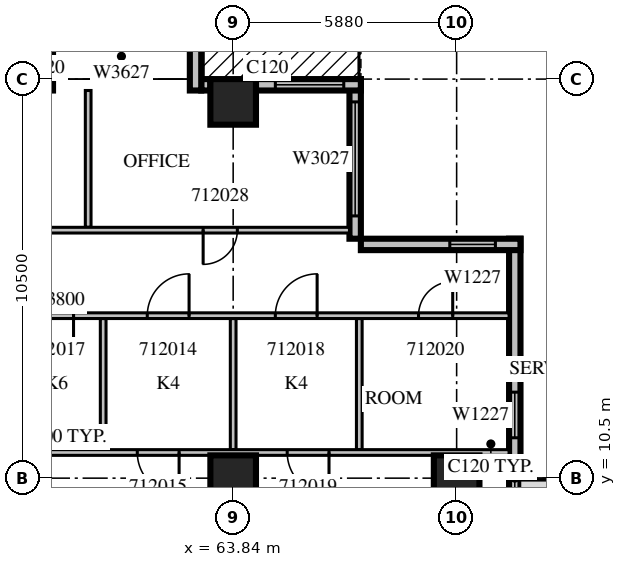
"""IFC4 building model, lengths in metres.
Left out: names, types, materials, properties, quantities, classifications, styles, units other than length and angle.
Written with IfcOpenShell. Run it as: python <this file> out.ifc"""

import sys

from ifc_helpers import new_model, si_unit, direction, frame, frame_2d, origin, origin_2d, place, context, subcontext, project, spatial, rectangle, extrude, source, transform, mapped, element, fill, save


model = new_model("IFC4")
c1 = context("Model", 3, precision=1e-05, world=origin(), true_north=direction((0.0, 1.0)))
c2 = subcontext(c1, "Body", "Model", "MODEL_VIEW")
j1 = project(units=[si_unit("LENGTHUNIT", "METRE"), si_unit("PLANEANGLEUNIT", "RADIAN")], contexts=[c1])
p1 = place(None, origin())
s1 = spatial("IfcSite", under=j1, at=p1, CompositionType="ELEMENT")
p2 = place(p1, origin())
s2 = spatial("IfcBuilding", under=s1, at=p2, CompositionType="ELEMENT")
p3 = place(p2, frame((0.0, 0.0, 61.5)))
s3 = spatial("IfcBuildingStorey", under=s2, at=p3, CompositionType="ELEMENT", Elevation=61.5)
m1 = source(origin(), c2, "Body", "SweptSolid", [
    extrude(rectangle(XDim=1.2, YDim=1.2, at=origin_2d()), origin(), (0.0, 0.0, 1.0), 4.2),
])
for number, where, z_axis, x_axis in (
    (1, (63.84, 10.5, 0.0), (0.0, 0.0, 1.0), (1.0, 0.0, 0.0)),
    (2, (69.72, 10.5, 0.0), (0.0, 0.0, 1.0), (1.0, 0.0, 0.0)),
    (3, (63.84, 20.4, 0.0), (0.0, 0.0, 1.0), (1.0, 0.0, 0.0)),
):
    element("IfcColumn", number, at=place(p3, frame(where, z_axis=z_axis, x_axis=x_axis)), inside=s3, PredefinedType="COLUMN", context=c2, shape_type="MappedRepresentation", body=[
        mapped(m1, transform((0.0, 0.0, 0.0), scale=1.0)),
    ])
m2 = source(origin(), c2, "Body", "SweptSolid", [
    extrude(rectangle(XDim=3.15, YDim=0.3, at=frame_2d((1.575, 0.0))), origin(), (0.0, 0.0, 1.0), 3.8),
])
p4 = place(p3, frame((71.25, 7.35, 0.0), z_axis=(0.0, 0.0, 1.0), x_axis=(0.0, 1.0, 0.0)))
e4 = element("IfcWall", 4, at=p4, inside=s3, PredefinedType="STANDARD", context=c2, shape_type="MappedRepresentation", body=[
    mapped(m2, transform((0.0, 0.0, 0.0), scale=1.0)),
])
m3 = source(origin(), c2, "Body", "SweptSolid", [
    extrude(rectangle(XDim=1.8, YDim=2.4, at=frame_2d((0.9, 1.2))), frame((0.0, 0.16, 0.0), z_axis=(0.0, -1.0, 0.0), x_axis=(1.0, 0.0, 0.0)), (0.0, 0.0, 1.0), 0.32),
])
p5 = place(p4, frame((0.675, 0.0, 0.0)))
e5 = element("IfcOpeningElement", 5, at=p5, cuts=e4, PredefinedType="OPENING", context=c2, shape_type="MappedRepresentation", body=[
    mapped(m3, transform((0.0, 0.0, 0.0), scale=1.0)),
])
m4 = source(origin(), c2, "Body", "SweptSolid", [
    extrude(rectangle(XDim=6.3, YDim=0.3, at=frame_2d((3.15, 0.0))), origin(), (0.0, 0.0, 1.0), 3.8),
])
p6 = place(p3, frame((71.25, 10.5, 0.0), z_axis=(0.0, 0.0, 1.0), x_axis=(0.0, 1.0, 0.0)))
e6 = element("IfcWall", 6, at=p6, inside=s3, PredefinedType="STANDARD", context=c2, shape_type="MappedRepresentation", body=[
    mapped(m4, transform((0.0, 0.0, 0.0), scale=1.0)),
])
m5 = source(origin(), c2, "Body", "SweptSolid", [
    extrude(rectangle(XDim=1.2, YDim=2.7, at=frame_2d((0.6, 1.35))), frame((0.0, 0.16, 0.0), z_axis=(0.0, -1.0, 0.0), x_axis=(1.0, 0.0, 0.0)), (0.0, 0.0, 1.0), 0.32),
])
p7 = place(p6, frame((1.062, 0.0, 0.6)))
e7 = element("IfcOpeningElement", 7, at=p7, cuts=e6, PredefinedType="OPENING", context=c2, shape_type="MappedRepresentation", body=[
    mapped(m5, transform((0.0, 0.0, 0.0), scale=1.0)),
])
m6 = source(origin(), c2, "Body", "SweptSolid", [
    extrude(rectangle(XDim=4.2, YDim=0.3, at=frame_2d((2.1, 0.0))), origin(), (0.0, 0.0, 1.0), 3.8),
])
p8 = place(p3, frame((71.4, 16.65, 0.0), z_axis=(0.0, 0.0, 1.0), x_axis=(-1.0, 0.0, 0.0)))
e8 = element("IfcWall", 8, at=p8, inside=s3, PredefinedType="STANDARD", context=c2, shape_type="MappedRepresentation", body=[
    mapped(m6, transform((0.0, 0.0, 0.0), scale=1.0)),
])
p9 = place(p8, frame((0.66, 0.0, 0.6)))
e9 = element("IfcOpeningElement", 9, at=p9, cuts=e8, PredefinedType="OPENING", context=c2, shape_type="MappedRepresentation", body=[
    mapped(m5, transform((0.0, 0.0, 0.0), scale=1.0)),
])
p10 = place(p3, frame((67.05, 16.8, 0.0), z_axis=(0.0, 0.0, 1.0), x_axis=(0.0, 1.0, 0.0)))
e10 = element("IfcWall", 10, at=p10, inside=s3, PredefinedType="STANDARD", context=c2, shape_type="MappedRepresentation", body=[
    mapped(m6, transform((0.0, 0.0, 0.0), scale=1.0)),
])
m7 = source(origin(), c2, "Body", "SweptSolid", [
    extrude(rectangle(XDim=3.0, YDim=2.7, at=frame_2d((1.5, 1.35))), frame((0.0, 0.16, 0.0), z_axis=(0.0, -1.0, 0.0), x_axis=(1.0, 0.0, 0.0)), (0.0, 0.0, 1.0), 0.32),
])
p11 = place(p10, frame((0.6, 0.0, 0.6)))
e11 = element("IfcOpeningElement", 11, at=p11, cuts=e10, PredefinedType="OPENING", context=c2, shape_type="MappedRepresentation", body=[
    mapped(m7, transform((0.0, 0.0, 0.0), scale=1.0)),
])
m8 = source(origin(), c2, "Body", "SweptSolid", [
    extrude(rectangle(XDim=2.76, YDim=0.3, at=frame_2d((1.38, 0.0))), origin(), (0.0, 0.0, 1.0), 3.8),
])
p12 = place(p3, frame((67.2, 20.85, 0.0), z_axis=(0.0, 0.0, 1.0), x_axis=(-1.0, 0.0, 0.0)))
e12 = element("IfcWall", 12, at=p12, inside=s3, PredefinedType="STANDARD", context=c2, shape_type="MappedRepresentation", body=[
    mapped(m8, transform((0.0, 0.0, 0.0), scale=1.0)),
])
p13 = place(p12, frame((0.45, 0.0, 0.0)))
e13 = element("IfcOpeningElement", 13, at=p13, cuts=e12, PredefinedType="OPENING", context=c2, shape_type="MappedRepresentation", body=[
    mapped(m3, transform((0.0, 0.0, 0.0), scale=1.0)),
])
m9 = source(origin(), c2, "Body", "SweptSolid", [
    extrude(rectangle(XDim=0.24, YDim=0.3, at=frame_2d((0.12, 0.0))), origin(), (0.0, 0.0, 1.0), 3.8),
])
p14 = place(p3, frame((63.24, 20.85, 0.0), z_axis=(0.0, 0.0, 1.0), x_axis=(-1.0, 0.0, 0.0)))
e14 = element("IfcWall", 14, at=p14, inside=s3, PredefinedType="STANDARD", context=c2, shape_type="MappedRepresentation", body=[
    mapped(m9, transform((0.0, 0.0, 0.0), scale=1.0)),
])
m10 = source(origin(), c2, "Body", "SweptSolid", [
    extrude(rectangle(XDim=1.2, YDim=0.3, at=frame_2d((0.6, 0.0))), origin(), (0.0, 0.0, 1.0), 3.8),
])
p15 = place(p3, frame((62.85, 20.7, 0.0), z_axis=(0.0, 0.0, 1.0), x_axis=(0.0, 1.0, 0.0)))
e15 = element("IfcWall", 15, at=p15, inside=s3, PredefinedType="STANDARD", context=c2, shape_type="MappedRepresentation", body=[
    mapped(m10, transform((0.0, 0.0, 0.0), scale=1.0)),
])
m11 = source(origin(), c2, "Body", "SweptSolid", [
    extrude(rectangle(XDim=3.45, YDim=0.15, at=frame_2d((1.725, 0.0))), origin(), (0.0, 0.0, 1.0), 3.8),
])
for number, where, z_axis, x_axis in (
    (16, (60.42, 11.25, 0.0), (0.0, 0.0, 1.0), (0.0, 1.0, 0.0)),
    (17, (67.158, 11.25, 0.0), (0.0, 0.0, 1.0), (0.0, 1.0, 0.0)),
    (18, (63.84, 11.25, 0.0), (0.0, 0.0, 1.0), (0.0, 1.0, 0.0)),
):
    element("IfcWall", number, at=place(p3, frame(where, z_axis=z_axis, x_axis=x_axis)), inside=s3, PredefinedType="PARTITIONING", context=c2, shape_type="MappedRepresentation", body=[
        mapped(m11, transform((0.0, 0.0, 0.0), scale=1.0)),
    ])
m12 = source(origin(), c2, "Body", "SweptSolid", [
    extrude(rectangle(XDim=24.9, YDim=0.15, at=frame_2d((12.45, 0.0))), origin(), (0.0, 0.0, 1.0), 3.8),
])
p16 = place(p3, frame((71.1, 11.175, 0.0), z_axis=(0.0, 0.0, 1.0), x_axis=(-1.0, 0.0, 0.0)))
e19 = element("IfcWall", 19, at=p16, inside=s3, PredefinedType="PARTITIONING", context=c2, shape_type="MappedRepresentation", body=[
    mapped(m12, transform((0.0, 0.0, 0.0), scale=1.0)),
])
m13 = source(origin(), c2, "Body", "SweptSolid", [
    extrude(rectangle(XDim=1.1, YDim=2.1, at=frame_2d((0.55, 1.05))), frame((0.0, 0.085, 0.0), z_axis=(0.0, -1.0, 0.0), x_axis=(1.0, 0.0, 0.0)), (0.0, 0.0, 1.0), 0.17),
])
p17 = place(p16, frame((22.753, 0.0, 0.0)))
e20 = element("IfcOpeningElement", 20, at=p17, cuts=e19, PredefinedType="OPENING", context=c2, shape_type="MappedRepresentation", body=[
    mapped(m13, transform((0.0, 0.0, 0.0), scale=1.0)),
])
p18 = place(p16, frame((8.683, 0.0, 0.0)))
e21 = element("IfcOpeningElement", 21, at=p18, cuts=e19, PredefinedType="OPENING", context=c2, shape_type="MappedRepresentation", body=[
    mapped(m13, transform((0.0, 0.0, 0.0), scale=1.0)),
])
p19 = place(p16, frame((4.738, 0.0, 0.0)))
e22 = element("IfcOpeningElement", 22, at=p19, cuts=e19, PredefinedType="OPENING", context=c2, shape_type="MappedRepresentation", body=[
    mapped(m13, transform((0.0, 0.0, 0.0), scale=1.0)),
])
m14 = source(origin(), c2, "Body", "SweptSolid", [
    extrude(rectangle(XDim=3.6, YDim=0.15, at=frame_2d((1.8, 0.0))), origin(), (0.0, 0.0, 1.0), 3.8),
])
p20 = place(p3, frame((60.025, 20.7, 0.0), z_axis=(0.0, 0.0, 1.0), x_axis=(0.0, -1.0, 0.0)))
e23 = element("IfcWall", 23, at=p20, inside=s3, PredefinedType="PARTITIONING", context=c2, shape_type="MappedRepresentation", body=[
    mapped(m14, transform((0.0, 0.0, 0.0), scale=1.0)),
])
p21 = place(p3, frame((71.1, 14.775, 0.0), z_axis=(0.0, 0.0, 1.0), x_axis=(-1.0, 0.0, 0.0)))
e24 = element("IfcWall", 24, at=p21, inside=s3, PredefinedType="PARTITIONING", context=c2, shape_type="MappedRepresentation", body=[
    mapped(m12, transform((0.0, 0.0, 0.0), scale=1.0)),
])
p22 = place(p21, frame((23.066, 0.0, 0.0)))
e25 = element("IfcOpeningElement", 25, at=p22, cuts=e24, PredefinedType="OPENING", context=c2, shape_type="MappedRepresentation", body=[
    mapped(m13, transform((0.0, 0.0, 0.0), scale=1.0)),
])
m15 = source(origin(), c2, "Body", "SweptSolid", [
    extrude(rectangle(XDim=0.9, YDim=2.1, at=frame_2d((0.45, 1.05))), frame((0.0, 0.085, 0.0), z_axis=(0.0, -1.0, 0.0), x_axis=(1.0, 0.0, 0.0)), (0.0, 0.0, 1.0), 0.17),
])
p23 = place(p21, frame((20.226, 0.0, 0.0)))
e26 = element("IfcOpeningElement", 26, at=p23, cuts=e24, PredefinedType="OPENING", context=c2, shape_type="MappedRepresentation", body=[
    mapped(m15, transform((0.0, 0.0, 0.0), scale=1.0)),
])
p24 = place(p21, frame((8.42, 0.0, 0.0)))
e27 = element("IfcOpeningElement", 27, at=p24, cuts=e24, PredefinedType="OPENING", context=c2, shape_type="MappedRepresentation", body=[
    mapped(m13, transform((0.0, 0.0, 0.0), scale=1.0)),
])
p25 = place(p21, frame((15.63, 0.0, 0.0)))
e28 = element("IfcOpeningElement", 28, at=p25, cuts=e24, PredefinedType="OPENING", context=c2, shape_type="MappedRepresentation", body=[
    mapped(m15, transform((0.0, 0.0, 0.0), scale=1.0)),
])
p26 = place(p21, frame((11.46, 0.0, 0.0)))
e29 = element("IfcOpeningElement", 29, at=p26, cuts=e24, PredefinedType="OPENING", context=c2, shape_type="MappedRepresentation", body=[
    mapped(m15, transform((0.0, 0.0, 0.0), scale=1.0)),
])
p27 = place(p21, frame((5.051, 0.0, 0.0)))
e30 = element("IfcOpeningElement", 30, at=p27, cuts=e24, PredefinedType="OPENING", context=c2, shape_type="MappedRepresentation", body=[
    mapped(m13, transform((0.0, 0.0, 0.0), scale=1.0)),
])
p28 = place(p21, frame((1.483, 0.0, 0.0)))
e31 = element("IfcOpeningElement", 31, at=p28, cuts=e24, PredefinedType="OPENING", context=c2, shape_type="MappedRepresentation", body=[
    mapped(m15, transform((0.0, 0.0, 0.0), scale=1.0)),
])
m16 = source(origin(), c2, "Body", "SweptSolid", [
    extrude(rectangle(XDim=37.5, YDim=0.15, at=frame_2d((18.75, 0.0))), origin(), (0.0, 0.0, 1.0), 3.3),
])
p29 = place(p3, frame((29.4, 17.025, 0.0), z_axis=(0.0, 0.0, 1.0), x_axis=(1.0, 0.0, 0.0)))
e32 = element("IfcWall", 32, at=p29, inside=s3, PredefinedType="PARTITIONING", context=c2, shape_type="MappedRepresentation", body=[
    mapped(m16, transform((0.0, 0.0, 0.0), scale=1.0)),
])
m17 = source(origin(), c2, "Body", "SweptSolid", [
    extrude(rectangle(XDim=1.0, YDim=2.1, at=frame_2d((0.5, 1.05))), frame((0.0, 0.085, 0.0), z_axis=(0.0, -1.0, 0.0), x_axis=(1.0, 0.0, 0.0)), (0.0, 0.0, 1.0), 0.17),
])
p30 = place(p29, frame((1.357, 0.0, 0.0)))
e33 = element("IfcOpeningElement", 33, at=p30, cuts=e32, PredefinedType="OPENING", context=c2, shape_type="MappedRepresentation", body=[
    mapped(m17, transform((0.0, 0.0, 0.0), scale=1.0)),
])
p31 = place(p29, frame((4.669, 0.0, 0.0)))
e34 = element("IfcOpeningElement", 34, at=p31, cuts=e32, PredefinedType="OPENING", context=c2, shape_type="MappedRepresentation", body=[
    mapped(m17, transform((0.0, 0.0, 0.0), scale=1.0)),
])
p32 = place(p29, frame((7.012, 0.0, 0.0)))
e35 = element("IfcOpeningElement", 35, at=p32, cuts=e32, PredefinedType="OPENING", context=c2, shape_type="MappedRepresentation", body=[
    mapped(m17, transform((0.0, 0.0, 0.0), scale=1.0)),
])
p33 = place(p29, frame((10.05, 0.0, 0.0)))
e36 = element("IfcOpeningElement", 36, at=p33, cuts=e32, PredefinedType="OPENING", context=c2, shape_type="MappedRepresentation", body=[
    mapped(m15, transform((0.0, 0.0, 0.0), scale=1.0)),
])
p34 = place(p29, frame((14.25, 0.0, 0.0)))
e37 = element("IfcOpeningElement", 37, at=p34, cuts=e32, PredefinedType="OPENING", context=c2, shape_type="MappedRepresentation", body=[
    mapped(m15, transform((0.0, 0.0, 0.0), scale=1.0)),
])
p35 = place(p29, frame((19.825, 0.0, 0.0)))
e38 = element("IfcOpeningElement", 38, at=p35, cuts=e32, PredefinedType="OPENING", context=c2, shape_type="MappedRepresentation", body=[
    mapped(m15, transform((0.0, 0.0, 0.0), scale=1.0)),
])
p36 = place(p29, frame((26.738, 0.0, 0.0)))
e39 = element("IfcOpeningElement", 39, at=p36, cuts=e32, PredefinedType="OPENING", context=c2, shape_type="MappedRepresentation", body=[
    mapped(m15, transform((0.0, 0.0, 0.0), scale=1.0)),
])
p37 = place(p29, frame((33.65, 0.0, 0.0)))
e40 = element("IfcOpeningElement", 40, at=p37, cuts=e32, PredefinedType="OPENING", context=c2, shape_type="MappedRepresentation", body=[
    mapped(m15, transform((0.0, 0.0, 0.0), scale=1.0)),
])
m18 = source(origin(), c2, "Body", "SweptSolid", [
    extrude(rectangle(XDim=1.2, YDim=2.7, at=frame_2d((0.6, 1.35))), frame((0.0, 0.03, 0.0), z_axis=(0.0, -1.0, 0.0), x_axis=(1.0, 0.0, 0.0)), (0.0, 0.0, 1.0), 0.06),
])
p38 = place(p7, origin())
e41 = element("IfcWindow", 41, at=p38, inside=s3, PartitioningType="SINGLE_PANEL", PredefinedType="WINDOW", context=c2, shape_type="MappedRepresentation", body=[
    mapped(m18, transform((0.0, 0.0, 0.0), scale=1.0)),
])
fill(e7, e41)
p39 = place(p9, origin())
e42 = element("IfcWindow", 42, at=p39, inside=s3, PartitioningType="SINGLE_PANEL", PredefinedType="WINDOW", context=c2, shape_type="MappedRepresentation", body=[
    mapped(m18, transform((0.0, 0.0, 0.0), scale=1.0)),
])
fill(e9, e42)
m19 = source(origin(), c2, "Body", "SweptSolid", [
    extrude(rectangle(XDim=3.0, YDim=2.7, at=frame_2d((1.5, 1.35))), frame((0.0, 0.03, 0.0), z_axis=(0.0, -1.0, 0.0), x_axis=(1.0, 0.0, 0.0)), (0.0, 0.0, 1.0), 0.06),
])
p40 = place(p11, origin())
e43 = element("IfcWindow", 43, at=p40, inside=s3, PartitioningType="SINGLE_PANEL", PredefinedType="WINDOW", context=c2, shape_type="MappedRepresentation", body=[
    mapped(m19, transform((0.0, 0.0, 0.0), scale=1.0)),
])
fill(e11, e43)
m20 = source(origin(), c2, "Body", "SweptSolid", [
    extrude(rectangle(XDim=1.8, YDim=2.4, at=frame_2d((0.9, 1.2))), frame((0.0, 0.025, 0.0), z_axis=(0.0, -1.0, 0.0), x_axis=(1.0, 0.0, 0.0)), (0.0, 0.0, 1.0), 0.05),
])
p41 = place(p13, origin())
e44 = element("IfcDoor", 44, at=p41, inside=s3, OperationType="SLIDING_TO_LEFT", PredefinedType="DOOR", context=c2, shape_type="MappedRepresentation", body=[
    mapped(m20, transform((0.0, 0.0, 0.0), scale=1.0)),
])
fill(e13, e44)
m21 = source(origin(), c2, "Body", "SweptSolid", [
    extrude(rectangle(XDim=1.1, YDim=2.1, at=frame_2d((0.55, 1.05))), frame((0.0, 0.025, 0.0), z_axis=(0.0, -1.0, 0.0), x_axis=(1.0, 0.0, 0.0)), (0.0, 0.0, 1.0), 0.05),
])
p42 = place(p24, origin())
e45 = element("IfcDoor", 45, at=p42, inside=s3, OperationType="SINGLE_SWING_RIGHT", PredefinedType="DOOR", context=c2, shape_type="MappedRepresentation", body=[
    mapped(m21, transform((0.0, 0.0, 0.0), scale=1.0)),
])
fill(e27, e45)
p43 = place(p18, origin())
e46 = element("IfcDoor", 46, at=p43, inside=s3, OperationType="SINGLE_SWING_LEFT", PredefinedType="DOOR", context=c2, shape_type="MappedRepresentation", body=[
    mapped(m21, transform((0.0, 0.0, 0.0), scale=1.0)),
])
fill(e21, e46)
m22 = source(origin(), c2, "Body", "SweptSolid", [
    extrude(rectangle(XDim=0.9, YDim=2.1, at=frame_2d((0.45, 1.05))), frame((0.0, 0.025, 0.0), z_axis=(0.0, -1.0, 0.0), x_axis=(1.0, 0.0, 0.0)), (0.0, 0.0, 1.0), 0.05),
])
p44 = place(p26, origin())
e47 = element("IfcDoor", 47, at=p44, inside=s3, OperationType="SINGLE_SWING_LEFT", PredefinedType="DOOR", context=c2, shape_type="MappedRepresentation", body=[
    mapped(m22, transform((0.0, 0.0, 0.0), scale=1.0)),
])
fill(e29, e47)
p45 = place(p27, origin())
e48 = element("IfcDoor", 48, at=p45, inside=s3, OperationType="SINGLE_SWING_RIGHT", PredefinedType="DOOR", context=c2, shape_type="MappedRepresentation", body=[
    mapped(m21, transform((0.0, 0.0, 0.0), scale=1.0)),
])
fill(e30, e48)
p46 = place(p19, origin())
e49 = element("IfcDoor", 49, at=p46, inside=s3, OperationType="SINGLE_SWING_LEFT", PredefinedType="DOOR", context=c2, shape_type="MappedRepresentation", body=[
    mapped(m21, transform((0.0, 0.0, 0.0), scale=1.0)),
])
fill(e22, e49)
p47 = place(p28, origin())
e50 = element("IfcDoor", 50, at=p47, inside=s3, OperationType="SINGLE_SWING_RIGHT", PredefinedType="DOOR", context=c2, shape_type="MappedRepresentation", body=[
    mapped(m22, transform((0.0, 0.0, 0.0), scale=1.0)),
])
fill(e31, e50)
p48 = place(p37, origin())
e51 = element("IfcDoor", 51, at=p48, inside=s3, OperationType="SINGLE_SWING_RIGHT", PredefinedType="DOOR", context=c2, shape_type="MappedRepresentation", body=[
    mapped(m22, transform((0.0, 0.0, 0.0), scale=1.0)),
])
fill(e40, e51)
save(model, sys.argv[1])
